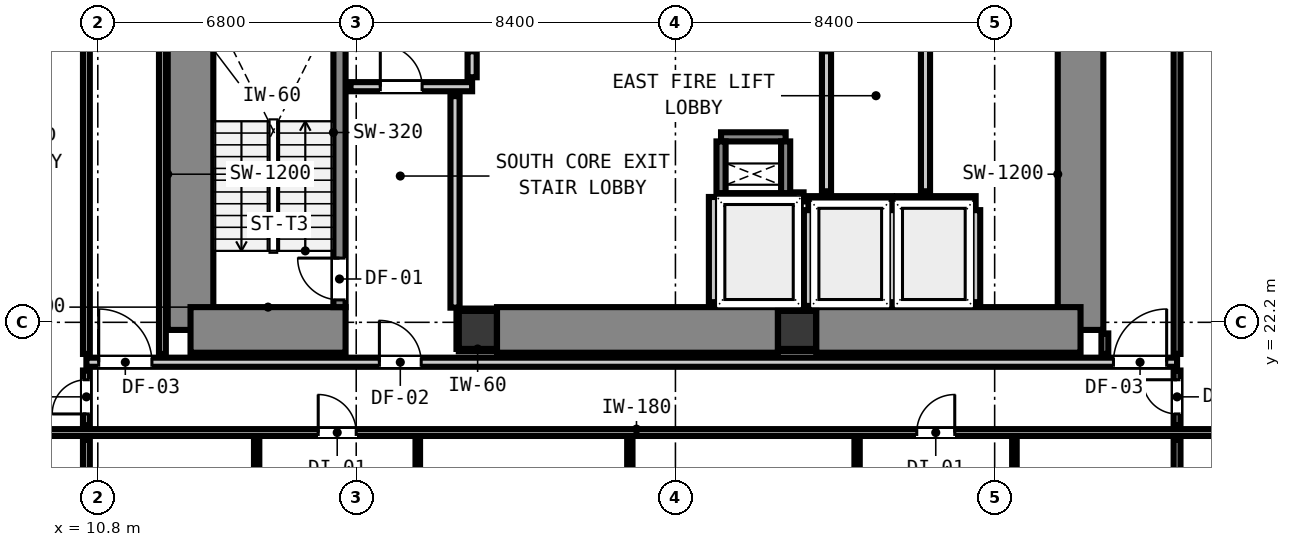
"""IFC4 building model, lengths in metres.
Left out: names, types, materials, properties, quantities, classifications, styles, units other than length and angle.
Written with IfcOpenShell. Run it as: python <this file> out.ifc"""

import sys

from ifc_helpers import new_model, si_unit, direction, frame, frame_2d, origin, origin_2d, place, context, subcontext, project, spatial, rectangle, extrude, element, fill, save


model = new_model("IFC4")
c1 = context("Model", 3, precision=1e-05, world=origin(), true_north=direction((0.0, 1.0)))
c2 = subcontext(c1, "Body", "Model", "MODEL_VIEW")
j1 = project(units=[si_unit("LENGTHUNIT", "METRE"), si_unit("PLANEANGLEUNIT", "RADIAN")], contexts=[c1])
p1 = place(None, origin())
s1 = spatial("IfcSite", under=j1, at=p1, CompositionType="ELEMENT")
p2 = place(p1, origin())
s2 = spatial("IfcBuilding", under=s1, at=p2, CompositionType="ELEMENT")
p3 = place(p2, frame((0.0, 0.0, 9.4)))
s3 = spatial("IfcBuildingStorey", under=s2, at=p3, CompositionType="ELEMENT", Elevation=9.4)
for number, where, z_axis, x_axis in (
    (1, (20.8, 22.0, 0.0), (0.0, 0.0, 1.0), (1.0, 0.0, 0.0)),
    (2, (29.2, 22.0, 0.0), (0.0, 0.0, 1.0), (1.0, 0.0, 0.0)),
):
    element("IfcColumn", number, at=place(p3, frame(where, z_axis=z_axis, x_axis=x_axis)), inside=s3, PredefinedType="COLUMN", context=c2, shape_type="SweptSolid", body=[
        extrude(rectangle(XDim=1.0, YDim=1.0, at=origin_2d()), origin(), (0.0, 0.0, 1.0), 4.2),
    ])
p4 = place(p3, frame((13.24, 22.0, 0.0), z_axis=(0.0, 0.0, 1.0), x_axis=(0.0, 1.0, 0.0)))
e3 = element("IfcWall", 3, at=p4, inside=s3, PredefinedType="SHEAR", context=c2, shape_type="SweptSolid", body=[
    extrude(rectangle(XDim=8.195, YDim=1.2, at=frame_2d((4.098, 0.0))), origin(), (0.0, 0.0, 1.0), 4.2),
])
p5 = place(p3, frame((13.24, 22.0, 0.0), z_axis=(0.0, 0.0, 1.0), x_axis=(1.0, 0.0, 0.0)))
e4 = element("IfcWall", 4, at=p5, inside=s3, PredefinedType="SHEAR", context=c2, shape_type="SweptSolid", body=[
    extrude(rectangle(XDim=4.08, YDim=1.2, at=frame_2d((2.04, 0.0))), origin(), (0.0, 0.0, 1.0), 4.2),
])
p6 = place(p3, frame((36.66, 22.0, 0.0), z_axis=(0.0, 0.0, 1.0), x_axis=(0.0, 1.0, 0.0)))
e5 = element("IfcWall", 5, at=p6, inside=s3, PredefinedType="SHEAR", context=c2, shape_type="SweptSolid", body=[
    extrude(rectangle(XDim=8.195, YDim=1.2, at=frame_2d((4.098, 0.0))), origin(), (0.0, 0.0, 1.0), 4.2),
])
p7 = place(p3, frame((29.705, 22.0, 0.0), z_axis=(0.0, 0.0, 1.0), x_axis=(1.0, 0.0, 0.0)))
e6 = element("IfcWall", 6, at=p7, inside=s3, PredefinedType="SHEAR", context=c2, shape_type="SweptSolid", body=[
    extrude(rectangle(XDim=6.955, YDim=1.2, at=frame_2d((3.478, 0.0))), origin(), (0.0, 0.0, 1.0), 4.2),
])
p8 = place(p3, frame((21.305, 22.0, 0.0), z_axis=(0.0, 0.0, 1.0), x_axis=(1.0, 0.0, 0.0)))
e7 = element("IfcWall", 7, at=p8, inside=s3, PredefinedType="SHEAR", context=c2, shape_type="SweptSolid", body=[
    extrude(rectangle(XDim=7.39, YDim=1.2, at=frame_2d((3.695, 0.0))), origin(), (0.0, 0.0, 1.0), 4.2),
])
p9 = place(p3, frame((17.16, 22.6, 0.0), z_axis=(0.0, 0.0, 1.0), x_axis=(0.0, 1.0, 0.0)))
e8 = element("IfcWall", 8, at=p9, inside=s3, PredefinedType="SHEAR", context=c2, shape_type="SweptSolid", body=[
    extrude(rectangle(XDim=7.8, YDim=0.32, at=frame_2d((3.9, 0.0))), origin(), (0.0, 0.0, 1.0), 4.2),
])
p10 = place(p9, frame((0.19, 0.0, 0.0)))
e9 = element("IfcOpeningElement", 9, at=p10, cuts=e8, PredefinedType="OPENING", context=c2, shape_type="SweptSolid", body=[
    extrude(rectangle(XDim=1.1, YDim=2.15, at=frame_2d((0.55, 1.075))), frame((0.0, 0.17, 0.0), z_axis=(0.0, -1.0, 0.0), x_axis=(1.0, 0.0, 0.0)), (0.0, 0.0, 1.0), 0.34),
])
for number, where, z_axis, x_axis in (
    (10, (27.2, 25.48, 0.0), (0.0, 0.0, 1.0), (1.0, 0.0, 0.0)),
    (11, (27.2, 27.08, 0.0), (0.0, 0.0, 1.0), (1.0, 0.0, 0.0)),
):
    element("IfcWall", number, at=place(p3, frame(where, z_axis=z_axis, x_axis=x_axis)), inside=s3, PredefinedType="SHEAR", context=c2, shape_type="SweptSolid", body=[
        extrude(rectangle(XDim=1.7, YDim=0.24, at=frame_2d((0.85, 0.0))), origin(), (0.0, 0.0, 1.0), 4.2),
    ])
for number, where, z_axis, x_axis in (
    (12, (27.2, 25.6, 0.0), (0.0, 0.0, 1.0), (0.0, 1.0, 0.0)),
    (13, (28.9, 25.6, 0.0), (0.0, 0.0, 1.0), (0.0, 1.0, 0.0)),
):
    element("IfcWall", number, at=place(p3, frame(where, z_axis=z_axis, x_axis=x_axis)), inside=s3, PredefinedType="SHEAR", context=c2, shape_type="SweptSolid", body=[
        extrude(rectangle(XDim=1.36, YDim=0.24, at=frame_2d((0.68, 0.0))), origin(), (0.0, 0.0, 1.0), 4.2),
    ])
p11 = place(p3, frame((29.5, 25.4, 0.0), z_axis=(0.0, 0.0, 1.0), x_axis=(1.0, 0.0, 0.0)))
e14 = element("IfcWall", 14, at=p11, inside=s3, PredefinedType="PARTITIONING", context=c2, shape_type="SweptSolid", body=[
    extrude(rectangle(XDim=2.2, YDim=0.24, at=frame_2d((1.1, 0.0))), origin(), (0.0, 0.0, 1.0), 3.92),
])
p12 = place(p3, frame((29.5, 22.632, 0.0), z_axis=(0.0, 0.0, 1.0), x_axis=(0.0, 1.0, 0.0)))
e15 = element("IfcWall", 15, at=p12, inside=s3, PredefinedType="PARTITIONING", context=c2, shape_type="SweptSolid", body=[
    extrude(rectangle(XDim=2.52, YDim=0.24, at=frame_2d((1.26, 0.0))), origin(), (0.0, 0.0, 1.0), 2.955),
])
p13 = place(p3, frame((31.7, 22.73, 0.0), z_axis=(0.0, 0.0, 1.0), x_axis=(0.0, 1.0, 0.0)))
e16 = element("IfcWall", 16, at=p13, inside=s3, PredefinedType="PARTITIONING", context=c2, shape_type="SweptSolid", body=[
    extrude(rectangle(XDim=2.422, YDim=0.24, at=frame_2d((1.211, 0.0))), origin(), (0.0, 0.0, 1.0), 3.92),
])
p14 = place(p3, frame((31.828, 25.4, 0.0), z_axis=(0.0, 0.0, 1.0), x_axis=(1.0, 0.0, 0.0)))
e17 = element("IfcWall", 17, at=p14, inside=s3, PredefinedType="PARTITIONING", context=c2, shape_type="SweptSolid", body=[
    extrude(rectangle(XDim=2.072, YDim=0.24, at=frame_2d((1.036, 0.0))), origin(), (0.0, 0.0, 1.0), 3.92),
])
p15 = place(p3, frame((33.9, 22.73, 0.0), z_axis=(0.0, 0.0, 1.0), x_axis=(0.0, 1.0, 0.0)))
e18 = element("IfcWall", 18, at=p15, inside=s3, PredefinedType="PARTITIONING", context=c2, shape_type="SweptSolid", body=[
    extrude(rectangle(XDim=2.422, YDim=0.24, at=frame_2d((1.211, 0.0))), origin(), (0.0, 0.0, 1.0), 3.92),
])
p16 = place(p3, frame((29.103, 25.5, 0.0), z_axis=(0.0, 0.0, 1.0), x_axis=(1.0, 0.0, 0.0)))
e19 = element("IfcWall", 19, at=p16, inside=s3, PredefinedType="PARTITIONING", context=c2, shape_type="SweptSolid", body=[
    extrude(rectangle(XDim=0.269, YDim=0.24, at=frame_2d((0.135, 0.0))), origin(), (0.0, 0.0, 1.0), 3.92),
])
p17 = place(p3, frame((27.0, 22.73, 0.0), z_axis=(0.0, 0.0, 1.0), x_axis=(0.0, 1.0, 0.0)))
e20 = element("IfcWall", 20, at=p17, inside=s3, PredefinedType="PARTITIONING", context=c2, shape_type="SweptSolid", body=[
    extrude(rectangle(XDim=2.768, YDim=0.24, at=frame_2d((1.384, 0.0))), origin(), (0.0, 0.0, 1.0), 3.92),
])
p18 = place(p3, frame((10.5, 21.15, 0.0), z_axis=(0.0, 0.0, 1.0), x_axis=(1.0, 0.0, 0.0)))
e21 = element("IfcWall", 21, at=p18, inside=s3, PredefinedType="PARTITIONING", context=c2, shape_type="SweptSolid", body=[
    extrude(rectangle(XDim=28.7, YDim=0.24, at=frame_2d((14.35, 0.0))), origin(), (0.0, 0.0, 1.0), 3.92),
])
p19 = place(p18, frame((7.71, 0.0, 0.0)))
e22 = element("IfcOpeningElement", 22, at=p19, cuts=e21, PredefinedType="OPENING", context=c2, shape_type="SweptSolid", body=[
    extrude(rectangle(XDim=1.1, YDim=2.15, at=frame_2d((0.55, 1.075))), frame((0.0, 0.13, 0.0), z_axis=(0.0, -1.0, 0.0), x_axis=(1.0, 0.0, 0.0)), (0.0, 0.0, 1.0), 0.26),
])
p20 = place(p18, frame((0.324, 0.0, 0.0)))
e23 = element("IfcOpeningElement", 23, at=p20, cuts=e21, PredefinedType="OPENING", context=c2, shape_type="SweptSolid", body=[
    extrude(rectangle(XDim=1.4, YDim=2.15, at=frame_2d((0.7, 1.075))), frame((0.0, 0.13, 0.0), z_axis=(0.0, -1.0, 0.0), x_axis=(1.0, 0.0, 0.0)), (0.0, 0.0, 1.0), 0.26),
])
p21 = place(p18, frame((27.026, 0.0, 0.0)))
e24 = element("IfcOpeningElement", 24, at=p21, cuts=e21, PredefinedType="OPENING", context=c2, shape_type="SweptSolid", body=[
    extrude(rectangle(XDim=1.4, YDim=2.15, at=frame_2d((0.7, 1.075))), frame((0.0, 0.13, 0.0), z_axis=(0.0, -1.0, 0.0), x_axis=(1.0, 0.0, 0.0)), (0.0, 0.0, 1.0), 0.26),
])
p22 = place(p3, frame((17.45, 28.4, 0.0), z_axis=(0.0, 0.0, 1.0), x_axis=(1.0, 0.0, 0.0)))
e25 = element("IfcWall", 25, at=p22, inside=s3, PredefinedType="PARTITIONING", context=c2, shape_type="SweptSolid", body=[
    extrude(rectangle(XDim=3.2, YDim=0.24, at=frame_2d((1.6, 0.0))), origin(), (0.0, 0.0, 1.0), 3.92),
])
p23 = place(p22, frame((0.784, 0.0, 0.0)))
e26 = element("IfcOpeningElement", 26, at=p23, cuts=e25, PredefinedType="OPENING", context=c2, shape_type="SweptSolid", body=[
    extrude(rectangle(XDim=1.1, YDim=2.15, at=frame_2d((0.55, 1.075))), frame((0.0, 0.13, 0.0), z_axis=(0.0, -1.0, 0.0), x_axis=(1.0, 0.0, 0.0)), (0.0, 0.0, 1.0), 0.26),
])
p24 = place(p3, frame((4.352, 19.3, 0.0), z_axis=(0.0, 0.0, 1.0), x_axis=(1.0, 0.0, 0.0)))
e27 = element("IfcWall", 27, at=p24, inside=s3, PredefinedType="PARTITIONING", context=c2, shape_type="SweptSolid", body=[
    extrude(rectangle(XDim=43.296, YDim=0.18, at=frame_2d((21.648, 0.0))), origin(), (0.0, 0.0, 1.0), 3.92),
])
p25 = place(p24, frame((12.248, 0.0, 0.0)))
e28 = element("IfcOpeningElement", 28, at=p25, cuts=e27, PredefinedType="OPENING", context=c2, shape_type="SweptSolid", body=[
    extrude(rectangle(XDim=1.0, YDim=2.15, at=frame_2d((0.5, 1.075))), frame((0.0, 0.1, 0.0), z_axis=(0.0, -1.0, 0.0), x_axis=(1.0, 0.0, 0.0)), (0.0, 0.0, 1.0), 0.2),
])
p26 = place(p24, frame((27.998, 0.0, 0.0)))
e29 = element("IfcOpeningElement", 29, at=p26, cuts=e27, PredefinedType="OPENING", context=c2, shape_type="SweptSolid", body=[
    extrude(rectangle(XDim=1.0, YDim=2.15, at=frame_2d((0.5, 1.075))), frame((0.0, 0.1, 0.0), z_axis=(0.0, -1.0, 0.0), x_axis=(1.0, 0.0, 0.0)), (0.0, 0.0, 1.0), 0.2),
])
p27 = place(p3, frame((20.2, 22.586, 0.0), z_axis=(0.0, 0.0, 1.0), x_axis=(0.0, 1.0, 0.0)))
e30 = element("IfcWall", 30, at=p27, inside=s3, PredefinedType="PARTITIONING", context=c2, shape_type="SweptSolid", body=[
    extrude(rectangle(XDim=5.566, YDim=0.24, at=frame_2d((2.783, 0.0))), origin(), (0.0, 0.0, 1.0), 3.92),
])
p28 = place(p3, frame((20.65, 28.648, 0.0), z_axis=(0.0, 0.0, 1.0), x_axis=(0.0, 1.0, 0.0)))
e31 = element("IfcWall", 31, at=p28, inside=s3, PredefinedType="PARTITIONING", context=c2, shape_type="SweptSolid", body=[
    extrude(rectangle(XDim=0.684, YDim=0.24, at=frame_2d((0.342, 0.0))), origin(), (0.0, 0.0, 1.0), 2.955),
])
p29 = place(p3, frame((29.975, 25.648, 0.0), z_axis=(0.0, 0.0, 1.0), x_axis=(0.0, 1.0, 0.0)))
e32 = element("IfcWall", 32, at=p29, inside=s3, PredefinedType="PARTITIONING", context=c2, shape_type="SweptSolid", body=[
    extrude(rectangle(XDim=3.684, YDim=0.24, at=frame_2d((1.842, 0.0))), origin(), (0.0, 0.0, 1.0), 3.92),
])
p30 = place(p3, frame((32.58, 25.648, 0.0), z_axis=(0.0, 0.0, 1.0), x_axis=(0.0, 1.0, 0.0)))
e33 = element("IfcWall", 33, at=p30, inside=s3, PredefinedType="PARTITIONING", context=c2, shape_type="SweptSolid", body=[
    extrude(rectangle(XDim=4.622, YDim=0.24, at=frame_2d((2.311, 0.0))), origin(), (0.0, 0.0, 1.0), 3.92),
])
p31 = place(p3, frame((10.5, 16.372, 0.0), z_axis=(0.0, 0.0, 1.0), x_axis=(0.0, 1.0, 0.0)))
e34 = element("IfcWall", 34, at=p31, inside=s3, PredefinedType="PARTITIONING", context=c2, shape_type="SweptSolid", body=[
    extrude(rectangle(XDim=2.74, YDim=0.18, at=frame_2d((1.37, 0.0))), origin(), (0.0, 0.0, 1.0), 3.92),
])
p32 = place(p3, frame((10.5, 19.488, 0.0), z_axis=(0.0, 0.0, 1.0), x_axis=(0.0, 1.0, 0.0)))
e35 = element("IfcWall", 35, at=p32, inside=s3, PredefinedType="PARTITIONING", context=c2, shape_type="SweptSolid", body=[
    extrude(rectangle(XDim=1.444, YDim=0.18, at=frame_2d((0.722, 0.0))), origin(), (0.0, 0.0, 1.0), 3.92),
])
p33 = place(p32, frame((0.301, 0.0, 0.0)))
e36 = element("IfcOpeningElement", 36, at=p33, cuts=e35, PredefinedType="OPENING", context=c2, shape_type="SweptSolid", body=[
    extrude(rectangle(XDim=0.9, YDim=2.1, at=frame_2d((0.45, 1.05))), frame((0.0, 0.1, 0.0), z_axis=(0.0, -1.0, 0.0), x_axis=(1.0, 0.0, 0.0)), (0.0, 0.0, 1.0), 0.2),
])
p34 = place(p3, frame((10.5, 21.368, 0.0), z_axis=(0.0, 0.0, 1.0), x_axis=(0.0, 1.0, 0.0)))
e37 = element("IfcWall", 37, at=p34, inside=s3, PredefinedType="PARTITIONING", context=c2, shape_type="SweptSolid", body=[
    extrude(rectangle(XDim=9.274, YDim=0.18, at=frame_2d((4.637, 0.0))), origin(), (0.0, 0.0, 1.0), 3.92),
])
p35 = place(p3, frame((12.5, 21.368, 0.0), z_axis=(0.0, 0.0, 1.0), x_axis=(0.0, 1.0, 0.0)))
e38 = element("IfcWall", 38, at=p35, inside=s3, PredefinedType="PARTITIONING", context=c2, shape_type="SweptSolid", body=[
    extrude(rectangle(XDim=18.694, YDim=0.18, at=frame_2d((9.347, 0.0))), origin(), (0.0, 0.0, 1.0), 3.92),
])
p36 = place(p3, frame((37.3, 21.368, 0.0), z_axis=(0.0, 0.0, 1.0), x_axis=(0.0, 1.0, 0.0)))
e39 = element("IfcWall", 39, at=p36, inside=s3, PredefinedType="PARTITIONING", context=c2, shape_type="SweptSolid", body=[
    extrude(rectangle(XDim=0.54, YDim=0.18, at=frame_2d((0.27, 0.0))), origin(), (0.0, 0.0, 1.0), 3.92),
])
p37 = place(p3, frame((39.2, 12.258, 0.0), z_axis=(0.0, 0.0, 1.0), x_axis=(0.0, 1.0, 0.0)))
e40 = element("IfcWall", 40, at=p37, inside=s3, PredefinedType="PARTITIONING", context=c2, shape_type="SweptSolid", body=[
    extrude(rectangle(XDim=6.854, YDim=0.18, at=frame_2d((3.427, 0.0))), origin(), (0.0, 0.0, 1.0), 3.92),
])
p38 = place(p3, frame((39.2, 19.488, 0.0), z_axis=(0.0, 0.0, 1.0), x_axis=(0.0, 1.0, 0.0)))
e41 = element("IfcWall", 41, at=p38, inside=s3, PredefinedType="PARTITIONING", context=c2, shape_type="SweptSolid", body=[
    extrude(rectangle(XDim=1.444, YDim=0.18, at=frame_2d((0.722, 0.0))), origin(), (0.0, 0.0, 1.0), 3.92),
])
p39 = place(p38, frame((0.301, 0.0, 0.0)))
e42 = element("IfcOpeningElement", 42, at=p39, cuts=e41, PredefinedType="OPENING", context=c2, shape_type="SweptSolid", body=[
    extrude(rectangle(XDim=0.9, YDim=2.1, at=frame_2d((0.45, 1.05))), frame((0.0, 0.1, 0.0), z_axis=(0.0, -1.0, 0.0), x_axis=(1.0, 0.0, 0.0)), (0.0, 0.0, 1.0), 0.2),
])
p40 = place(p3, frame((39.2, 21.368, 0.0), z_axis=(0.0, 0.0, 1.0), x_axis=(0.0, 1.0, 0.0)))
e43 = element("IfcWall", 43, at=p40, inside=s3, PredefinedType="PARTITIONING", context=c2, shape_type="SweptSolid", body=[
    extrude(rectangle(XDim=18.694, YDim=0.18, at=frame_2d((9.347, 0.0))), origin(), (0.0, 0.0, 1.0), 3.92),
])
p41 = place(p3, frame((14.98, 16.352, 0.0), z_axis=(0.0, 0.0, 1.0), x_axis=(0.0, 1.0, 0.0)))
e44 = element("IfcWall", 44, at=p41, inside=s3, PredefinedType="PARTITIONING", context=c2, shape_type="SweptSolid", body=[
    extrude(rectangle(XDim=2.78, YDim=0.14, at=frame_2d((1.39, 0.0))), origin(), (0.0, 0.0, 1.0), 3.92),
])
p42 = place(p41, frame((0.957, 0.0, 0.0)))
e45 = element("IfcOpeningElement", 45, at=p42, cuts=e44, PredefinedType="OPENING", context=c2, shape_type="SweptSolid", body=[
    extrude(rectangle(XDim=0.86, YDim=2.02, at=frame_2d((0.43, 1.01))), frame((0.0, 0.08, 0.0), z_axis=(0.0, -1.0, 0.0), x_axis=(1.0, 0.0, 0.0)), (0.0, 0.0, 1.0), 0.16),
])
p43 = place(p3, frame((24.8, 16.352, 0.0), z_axis=(0.0, 0.0, 1.0), x_axis=(0.0, 1.0, 0.0)))
e46 = element("IfcWall", 46, at=p43, inside=s3, PredefinedType="PARTITIONING", context=c2, shape_type="SweptSolid", body=[
    extrude(rectangle(XDim=2.78, YDim=0.14, at=frame_2d((1.39, 0.0))), origin(), (0.0, 0.0, 1.0), 3.92),
])
p44 = place(p3, frame((30.78, 16.352, 0.0), z_axis=(0.0, 0.0, 1.0), x_axis=(0.0, 1.0, 0.0)))
e47 = element("IfcWall", 47, at=p44, inside=s3, PredefinedType="PARTITIONING", context=c2, shape_type="SweptSolid", body=[
    extrude(rectangle(XDim=2.78, YDim=0.14, at=frame_2d((1.39, 0.0))), origin(), (0.0, 0.0, 1.0), 3.92),
])
p45 = place(p44, frame((0.957, 0.0, 0.0)))
e48 = element("IfcOpeningElement", 48, at=p45, cuts=e47, PredefinedType="OPENING", context=c2, shape_type="SweptSolid", body=[
    extrude(rectangle(XDim=0.86, YDim=2.02, at=frame_2d((0.43, 1.01))), frame((0.0, 0.08, 0.0), z_axis=(0.0, -1.0, 0.0), x_axis=(1.0, 0.0, 0.0)), (0.0, 0.0, 1.0), 0.16),
])
p46 = place(p3, frame((19.22, 16.342, 0.0), z_axis=(0.0, 0.0, 1.0), x_axis=(0.0, 1.0, 0.0)))
e49 = element("IfcWall", 49, at=p46, inside=s3, PredefinedType="PARTITIONING", context=c2, shape_type="SweptSolid", body=[
    extrude(rectangle(XDim=2.8, YDim=0.12, at=frame_2d((1.4, 0.0))), origin(), (0.0, 0.0, 1.0), 3.92),
])
p47 = place(p46, frame((0.947, 0.0, 0.0)))
e50 = element("IfcOpeningElement", 50, at=p47, cuts=e49, PredefinedType="OPENING", context=c2, shape_type="SweptSolid", body=[
    extrude(rectangle(XDim=0.9, YDim=2.1, at=frame_2d((0.45, 1.05))), frame((0.0, 0.07, 0.0), z_axis=(0.0, -1.0, 0.0), x_axis=(1.0, 0.0, 0.0)), (0.0, 0.0, 1.0), 0.14),
])
p48 = place(p3, frame((34.92, 12.228, 0.0), z_axis=(0.0, 0.0, 1.0), x_axis=(0.0, 1.0, 0.0)))
e51 = element("IfcWall", 51, at=p48, inside=s3, PredefinedType="PARTITIONING", context=c2, shape_type="SweptSolid", body=[
    extrude(rectangle(XDim=6.914, YDim=0.12, at=frame_2d((3.457, 0.0))), origin(), (0.0, 0.0, 1.0), 3.92),
])
p49 = place(p48, frame((3.022, 0.0, 0.0)))
e52 = element("IfcOpeningElement", 52, at=p49, cuts=e51, PredefinedType="OPENING", context=c2, shape_type="SweptSolid", body=[
    extrude(rectangle(XDim=0.9, YDim=2.1, at=frame_2d((0.45, 1.05))), frame((0.0, 0.07, 0.0), z_axis=(0.0, -1.0, 0.0), x_axis=(1.0, 0.0, 0.0)), (0.0, 0.0, 1.0), 0.14),
])
for number, where, z_axis, x_axis in (
    (53, (20.3, 21.468, 0.0), (0.0, 0.0, 1.0), (1.0, 0.0, 0.0)),
    (54, (20.3, 22.532, 0.0), (0.0, 0.0, 1.0), (1.0, 0.0, 0.0)),
):
    element("IfcWall", number, at=place(p3, frame(where, z_axis=z_axis, x_axis=x_axis)), inside=s3, PredefinedType="PARTITIONING", context=c2, shape_type="SweptSolid", body=[
        extrude(rectangle(XDim=0.99, YDim=0.06, at=frame_2d((0.495, 0.0))), origin(), (0.0, 0.0, 1.0), 1.45),
    ])
p50 = place(p3, frame((20.268, 21.5, 0.0), z_axis=(0.0, 0.0, 1.0), x_axis=(0.0, 1.0, 0.0)))
e55 = element("IfcWall", 55, at=p50, inside=s3, PredefinedType="PARTITIONING", context=c2, shape_type="SweptSolid", body=[
    extrude(rectangle(XDim=1.0, YDim=0.06, at=frame_2d((0.5, 0.0))), origin(), (0.0, 0.0, 1.0), 1.45),
])
for number, where, z_axis, x_axis in (
    (56, (28.71, 21.468, 0.0), (0.0, 0.0, 1.0), (1.0, 0.0, 0.0)),
    (57, (28.71, 22.532, 0.0), (0.0, 0.0, 1.0), (1.0, 0.0, 0.0)),
):
    element("IfcWall", number, at=place(p3, frame(where, z_axis=z_axis, x_axis=x_axis)), inside=s3, PredefinedType="PARTITIONING", context=c2, shape_type="SweptSolid", body=[
        extrude(rectangle(XDim=0.98, YDim=0.06, at=frame_2d((0.49, 0.0))), origin(), (0.0, 0.0, 1.0), 1.45),
    ])
p51 = place(p10, origin())
e58 = element("IfcDoor", 58, at=p51, inside=s3, OperationType="SINGLE_SWING_RIGHT", PredefinedType="DOOR", context=c2, shape_type="SweptSolid", body=[
    extrude(rectangle(XDim=1.1, YDim=2.15, at=frame_2d((0.55, 1.075))), frame((0.0, 0.025, 0.0), z_axis=(0.0, -1.0, 0.0), x_axis=(1.0, 0.0, 0.0)), (0.0, 0.0, 1.0), 0.05),
])
fill(e9, e58)
p52 = place(p23, origin())
e59 = element("IfcDoor", 59, at=p52, inside=s3, OperationType="SINGLE_SWING_LEFT", PredefinedType="DOOR", context=c2, shape_type="SweptSolid", body=[
    extrude(rectangle(XDim=1.1, YDim=2.15, at=frame_2d((0.55, 1.075))), frame((0.0, 0.025, 0.0), z_axis=(0.0, -1.0, 0.0), x_axis=(1.0, 0.0, 0.0)), (0.0, 0.0, 1.0), 0.05),
])
fill(e26, e59)
p53 = place(p19, origin())
e60 = element("IfcDoor", 60, at=p53, inside=s3, OperationType="SINGLE_SWING_LEFT", PredefinedType="DOOR", context=c2, shape_type="SweptSolid", body=[
    extrude(rectangle(XDim=1.1, YDim=2.15, at=frame_2d((0.55, 1.075))), frame((0.0, 0.025, 0.0), z_axis=(0.0, -1.0, 0.0), x_axis=(1.0, 0.0, 0.0)), (0.0, 0.0, 1.0), 0.05),
])
fill(e22, e60)
p54 = place(p20, origin())
e61 = element("IfcDoor", 61, at=p54, inside=s3, OperationType="SINGLE_SWING_LEFT", PredefinedType="DOOR", context=c2, shape_type="SweptSolid", body=[
    extrude(rectangle(XDim=1.4, YDim=2.15, at=frame_2d((0.7, 1.075))), frame((0.0, 0.025, 0.0), z_axis=(0.0, -1.0, 0.0), x_axis=(1.0, 0.0, 0.0)), (0.0, 0.0, 1.0), 0.05),
])
fill(e23, e61)
p55 = place(p21, origin())
e62 = element("IfcDoor", 62, at=p55, inside=s3, OperationType="SINGLE_SWING_RIGHT", PredefinedType="DOOR", context=c2, shape_type="SweptSolid", body=[
    extrude(rectangle(XDim=1.4, YDim=2.15, at=frame_2d((0.7, 1.075))), frame((0.0, 0.025, 0.0), z_axis=(0.0, -1.0, 0.0), x_axis=(1.0, 0.0, 0.0)), (0.0, 0.0, 1.0), 0.05),
])
fill(e24, e62)
p56 = place(p33, origin())
e63 = element("IfcDoor", 63, at=p56, inside=s3, OperationType="SINGLE_SWING_LEFT", PredefinedType="DOOR", context=c2, shape_type="SweptSolid", body=[
    extrude(rectangle(XDim=0.9, YDim=2.1, at=frame_2d((0.45, 1.05))), frame((0.0, 0.025, 0.0), z_axis=(0.0, -1.0, 0.0), x_axis=(1.0, 0.0, 0.0)), (0.0, 0.0, 1.0), 0.05),
])
fill(e36, e63)
p57 = place(p39, origin())
e64 = element("IfcDoor", 64, at=p57, inside=s3, OperationType="SINGLE_SWING_RIGHT", PredefinedType="DOOR", context=c2, shape_type="SweptSolid", body=[
    extrude(rectangle(XDim=0.9, YDim=2.1, at=frame_2d((0.45, 1.05))), frame((0.0, 0.025, 0.0), z_axis=(0.0, -1.0, 0.0), x_axis=(1.0, 0.0, 0.0)), (0.0, 0.0, 1.0), 0.05),
])
fill(e42, e64)
p58 = place(p25, origin())
e65 = element("IfcDoor", 65, at=p58, inside=s3, OperationType="SINGLE_SWING_LEFT", PredefinedType="DOOR", context=c2, shape_type="SweptSolid", body=[
    extrude(rectangle(XDim=1.0, YDim=2.15, at=frame_2d((0.5, 1.075))), frame((0.0, 0.025, 0.0), z_axis=(0.0, -1.0, 0.0), x_axis=(1.0, 0.0, 0.0)), (0.0, 0.0, 1.0), 0.05),
])
fill(e28, e65)
p59 = place(p26, origin())
e66 = element("IfcDoor", 66, at=p59, inside=s3, OperationType="SINGLE_SWING_RIGHT", PredefinedType="DOOR", context=c2, shape_type="SweptSolid", body=[
    extrude(rectangle(XDim=1.0, YDim=2.15, at=frame_2d((0.5, 1.075))), frame((0.0, 0.025, 0.0), z_axis=(0.0, -1.0, 0.0), x_axis=(1.0, 0.0, 0.0)), (0.0, 0.0, 1.0), 0.05),
])
fill(e29, e66)
save(model, sys.argv[1])
